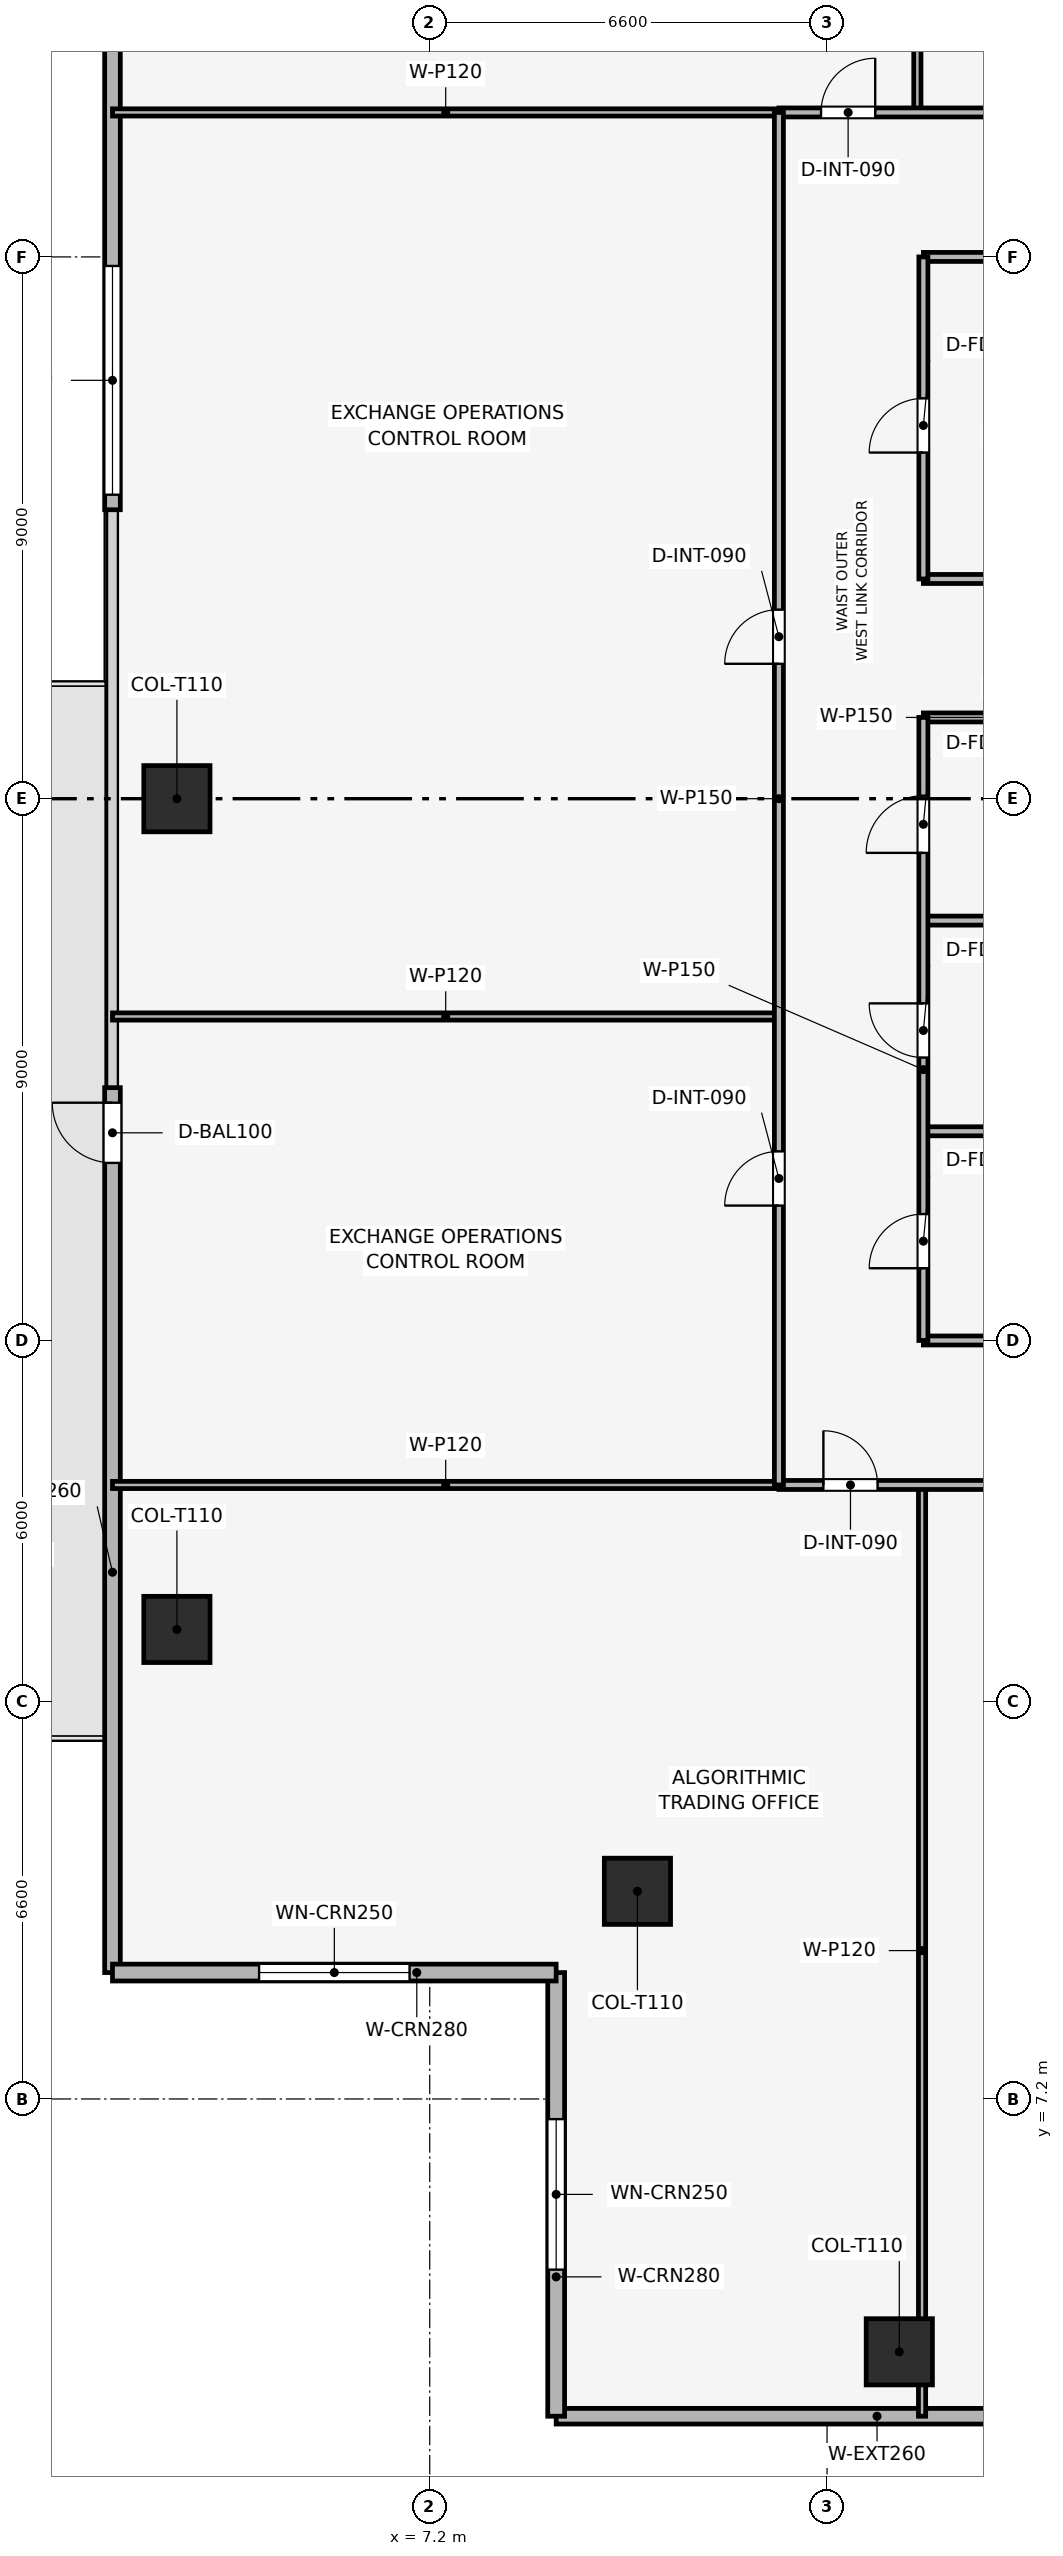
"""IFC4 building model, lengths in metres.
Left out: names, types, materials, properties, quantities, classifications, styles, units other than length and angle.
Written with IfcOpenShell. Run it as: python <this file> out.ifc"""

import sys

from ifc_helpers import new_model, si_unit, direction, frame, frame_2d, origin, origin_2d, place, context, subcontext, project, spatial, rectangle, extrude, element, fill, save


model = new_model("IFC4")
c1 = context("Model", 3, precision=1e-05, world=origin(), true_north=direction((0.0, 1.0)))
c2 = subcontext(c1, "Body", "Model", "MODEL_VIEW")
j1 = project(units=[si_unit("LENGTHUNIT", "METRE"), si_unit("PLANEANGLEUNIT", "RADIAN")], contexts=[c1])
p1 = place(None, origin())
s1 = spatial("IfcSite", under=j1, at=p1, CompositionType="ELEMENT")
p2 = place(p1, origin())
s2 = spatial("IfcBuilding", under=s1, at=p2, CompositionType="ELEMENT")
p3 = place(p2, frame((0.0, 0.0, 233.7)))
s3 = spatial("IfcBuildingStorey", under=s2, at=p3, CompositionType="ELEMENT", Elevation=233.7)
for number, where, z_axis, x_axis in (
    (1, (15.0, 3.0, 0.003), (0.0, 0.0, 1.0), (1.0, 0.0, 0.0)),
    (2, (3.0, 28.8, 0.003), (0.0, 0.0, 1.0), (1.0, 0.0, 0.0)),
    (3, (3.0, 15.0, 0.003), (0.0, 0.0, 1.0), (1.0, 0.0, 0.0)),
    (4, (10.65, 10.65, 0.003), (0.0, 0.0, 1.0), (1.0, 0.0, 0.0)),
):
    element("IfcColumn", number, at=place(p3, frame(where, z_axis=z_axis, x_axis=x_axis)), inside=s3, PredefinedType="COLUMN", context=c2, shape_type="SweptSolid", body=[
        extrude(rectangle(XDim=1.1, YDim=1.1, at=origin_2d()), origin(), (0.0, 0.0, 1.0), 3.494),
    ])
p4 = place(p3, frame((24.0, 1.93, 0.0), z_axis=(0.0, 0.0, 1.0), x_axis=(-1.0, 0.0, 0.0)))
e5 = element("IfcWall", 5, at=p4, inside=s3, PredefinedType="SOLIDWALL", context=c2, shape_type="SweptSolid", body=[
    extrude(rectangle(XDim=14.7, YDim=0.26, at=frame_2d((7.35, 0.0))), origin(), (0.0, 0.0, 1.0), 3.5),
])
p5 = place(p4, frame((2.33, 0.0, 0.9)))
e6 = element("IfcOpeningElement", 6, at=p5, cuts=e5, PredefinedType="OPENING", context=c2, shape_type="SweptSolid", body=[
    extrude(rectangle(XDim=3.8, YDim=1.9, at=frame_2d((1.9, 0.95))), frame((0.0, 0.14, 0.0), z_axis=(0.0, -1.0, 0.0), x_axis=(1.0, 0.0, 0.0)), (0.0, 0.0, 1.0), 0.28),
])
p6 = place(p3, frame((1.93, 9.3, 0.0), z_axis=(0.0, 0.0, 1.0), x_axis=(0.0, 1.0, 0.0)))
e7 = element("IfcWall", 7, at=p6, inside=s3, PredefinedType="SOLIDWALL", context=c2, shape_type="SweptSolid", body=[
    extrude(rectangle(XDim=14.7, YDim=0.26, at=frame_2d((7.35, 0.0))), origin(), (0.0, 0.0, 1.0), 3.5),
])
p7 = place(p6, frame((13.45, 0.0, 0.0)))
e8 = element("IfcOpeningElement", 8, at=p7, cuts=e7, PredefinedType="OPENING", context=c2, shape_type="SweptSolid", body=[
    extrude(rectangle(XDim=1.0, YDim=2.2, at=frame_2d((0.5, 1.1))), frame((0.0, 0.14, 0.0), z_axis=(0.0, -1.0, 0.0), x_axis=(1.0, 0.0, 0.0)), (0.0, 0.0, 1.0), 0.28),
])
p8 = place(p3, frame((1.93, 33.6, 0.0), z_axis=(0.0, 0.0, 1.0), x_axis=(0.0, 1.0, 0.0)))
e9 = element("IfcWall", 9, at=p8, inside=s3, PredefinedType="SOLIDWALL", context=c2, shape_type="SweptSolid", body=[
    extrude(rectangle(XDim=14.7, YDim=0.26, at=frame_2d((7.35, 0.0))), origin(), (0.0, 0.0, 1.0), 3.5),
])
p9 = place(p8, frame((0.25, 0.0, 0.9)))
e10 = element("IfcOpeningElement", 10, at=p9, cuts=e9, PredefinedType="OPENING", context=c2, shape_type="SweptSolid", body=[
    extrude(rectangle(XDim=3.8, YDim=1.9, at=frame_2d((1.9, 0.95))), frame((0.0, 0.14, 0.0), z_axis=(0.0, -1.0, 0.0), x_axis=(1.0, 0.0, 0.0)), (0.0, 0.0, 1.0), 0.28),
])
p10 = place(p3, frame((9.3, 1.93, 0.0), z_axis=(0.0, 0.0, 1.0), x_axis=(0.0, 1.0, 0.0)))
e11 = element("IfcWall", 11, at=p10, inside=s3, PredefinedType="SOLIDWALL", context=c2, shape_type="SweptSolid", body=[
    extrude(rectangle(XDim=7.37, YDim=0.28, at=frame_2d((3.685, 0.0))), origin(), (0.0, 0.0, 1.0), 3.5),
])
p11 = place(p10, frame((2.435, 0.0, 0.9)))
e12 = element("IfcOpeningElement", 12, at=p11, cuts=e11, PredefinedType="OPENING", context=c2, shape_type="SweptSolid", body=[
    extrude(rectangle(XDim=2.5, YDim=1.9, at=frame_2d((1.25, 0.95))), frame((0.0, 0.15, 0.0), z_axis=(0.0, -1.0, 0.0), x_axis=(1.0, 0.0, 0.0)), (0.0, 0.0, 1.0), 0.3),
])
p12 = place(p3, frame((9.3, 9.3, 0.0), z_axis=(0.0, 0.0, 1.0), x_axis=(-1.0, 0.0, 0.0)))
e13 = element("IfcWall", 13, at=p12, inside=s3, PredefinedType="SOLIDWALL", context=c2, shape_type="SweptSolid", body=[
    extrude(rectangle(XDim=7.37, YDim=0.28, at=frame_2d((3.685, 0.0))), origin(), (0.0, 0.0, 1.0), 3.5),
])
p13 = place(p12, frame((2.435, 0.0, 0.9)))
e14 = element("IfcOpeningElement", 14, at=p13, cuts=e13, PredefinedType="OPENING", context=c2, shape_type="SweptSolid", body=[
    extrude(rectangle(XDim=2.5, YDim=1.9, at=frame_2d((1.25, 0.95))), frame((0.0, 0.15, 0.0), z_axis=(0.0, -1.0, 0.0), x_axis=(1.0, 0.0, 0.0)), (0.0, 0.0, 1.0), 0.3),
])
p14 = place(p3, frame((15.4, 19.8, 0.0), z_axis=(0.0, 0.0, 1.0), x_axis=(1.0, 0.0, 0.0)))
e15 = element("IfcWall", 15, at=p14, inside=s3, PredefinedType="PARTITIONING", context=c2, shape_type="SweptSolid", body=[
    extrude(rectangle(XDim=4.4, YDim=0.15, at=frame_2d((2.2, 0.0))), origin(), (0.0, 0.0, 1.0), 3.035),
])
for number, where, z_axis, x_axis in (
    (16, (15.4, 23.275, 0.0), (0.0, 0.0, 1.0), (1.0, 0.0, 0.0)),
    (17, (15.4, 26.775, 0.0), (0.0, 0.0, 1.0), (1.0, 0.0, 0.0)),
    (18, (15.4, 30.15, 0.0), (0.0, 0.0, 1.0), (1.0, 0.0, 0.0)),
    (19, (15.4, 32.45, 0.0), (0.0, 0.0, 1.0), (1.0, 0.0, 0.0)),
):
    element("IfcWall", number, at=place(p3, frame(where, z_axis=z_axis, x_axis=x_axis)), inside=s3, PredefinedType="PARTITIONING", context=c2, shape_type="SweptSolid", body=[
        extrude(rectangle(XDim=4.4, YDim=0.15, at=frame_2d((2.2, 0.0))), origin(), (0.0, 0.0, 1.0), 3.5),
    ])
p15 = place(p3, frame((15.4, 37.8, 0.0), z_axis=(0.0, 0.0, 1.0), x_axis=(1.0, 0.0, 0.0)))
e20 = element("IfcWall", 20, at=p15, inside=s3, PredefinedType="PARTITIONING", context=c2, shape_type="SweptSolid", body=[
    extrude(rectangle(XDim=4.4, YDim=0.15, at=frame_2d((2.2, 0.0))), origin(), (0.0, 0.0, 1.0), 3.035),
])
p16 = place(p3, frame((15.4, 19.8, 0.0), z_axis=(0.0, 0.0, 1.0), x_axis=(0.0, 1.0, 0.0)))
e21 = element("IfcWall", 21, at=p16, inside=s3, PredefinedType="PARTITIONING", context=c2, shape_type="SweptSolid", body=[
    extrude(rectangle(XDim=10.35, YDim=0.15, at=frame_2d((5.175, 0.0))), origin(), (0.0, 0.0, 1.0), 3.035),
])
p17 = place(p16, frame((1.2, 0.0, 0.0)))
e22 = element("IfcOpeningElement", 22, at=p17, cuts=e21, PredefinedType="OPENING", context=c2, shape_type="SweptSolid", body=[
    extrude(rectangle(XDim=0.9, YDim=2.1, at=frame_2d((0.45, 1.05))), frame((0.0, 0.085, 0.0), z_axis=(0.0, -1.0, 0.0), x_axis=(1.0, 0.0, 0.0)), (0.0, 0.0, 1.0), 0.17),
])
p18 = place(p16, frame((4.7, 0.0, 0.0)))
e23 = element("IfcOpeningElement", 23, at=p18, cuts=e21, PredefinedType="OPENING", context=c2, shape_type="SweptSolid", body=[
    extrude(rectangle(XDim=0.9, YDim=2.1, at=frame_2d((0.45, 1.05))), frame((0.0, 0.085, 0.0), z_axis=(0.0, -1.0, 0.0), x_axis=(1.0, 0.0, 0.0)), (0.0, 0.0, 1.0), 0.17),
])
p19 = place(p16, frame((8.1, 0.0, 0.0)))
e24 = element("IfcOpeningElement", 24, at=p19, cuts=e21, PredefinedType="OPENING", context=c2, shape_type="SweptSolid", body=[
    extrude(rectangle(XDim=0.95, YDim=2.1, at=frame_2d((0.475, 1.05))), frame((0.0, 0.085, 0.0), z_axis=(0.0, -1.0, 0.0), x_axis=(1.0, 0.0, 0.0)), (0.0, 0.0, 1.0), 0.17),
])
p20 = place(p3, frame((15.4, 32.45, 0.0), z_axis=(0.0, 0.0, 1.0), x_axis=(0.0, 1.0, 0.0)))
e25 = element("IfcWall", 25, at=p20, inside=s3, PredefinedType="PARTITIONING", context=c2, shape_type="SweptSolid", body=[
    extrude(rectangle(XDim=5.35, YDim=0.15, at=frame_2d((2.675, 0.0))), origin(), (0.0, 0.0, 1.0), 3.035),
])
p21 = place(p20, frame((2.1, 0.0, 0.0)))
e26 = element("IfcOpeningElement", 26, at=p21, cuts=e25, PredefinedType="OPENING", context=c2, shape_type="SweptSolid", body=[
    extrude(rectangle(XDim=0.9, YDim=2.1, at=frame_2d((0.45, 1.05))), frame((0.0, 0.085, 0.0), z_axis=(0.0, -1.0, 0.0), x_axis=(1.0, 0.0, 0.0)), (0.0, 0.0, 1.0), 0.17),
])
for number, where, z_axis, x_axis in (
    (27, (15.378, 1.93, 0.0), (0.0, 0.0, 1.0), (0.0, 1.0, 0.0)),
    (28, (15.3, 40.2, 0.0), (0.0, 0.0, 1.0), (0.0, 1.0, 0.0)),
):
    element("IfcWall", number, at=place(p3, frame(where, z_axis=z_axis, x_axis=x_axis)), inside=s3, PredefinedType="PARTITIONING", context=c2, shape_type="SweptSolid", body=[
        extrude(rectangle(XDim=15.47, YDim=0.12, at=frame_2d((7.735, 0.0))), origin(), (0.0, 0.0, 1.0), 2.885),
    ])
for number, where, z_axis, x_axis in (
    (29, (1.93, 25.182, 0.0), (0.0, 0.0, 1.0), (1.0, 0.0, 0.0)),
    (30, (1.93, 17.4, 0.0), (0.0, 0.0, 1.0), (1.0, 0.0, 0.0)),
    (31, (1.93, 40.2, 0.0), (0.0, 0.0, 1.0), (1.0, 0.0, 0.0)),
):
    element("IfcWall", number, at=place(p3, frame(where, z_axis=z_axis, x_axis=x_axis)), inside=s3, PredefinedType="PARTITIONING", context=c2, shape_type="SweptSolid", body=[
        extrude(rectangle(XDim=11.07, YDim=0.12, at=frame_2d((5.535, 0.0))), origin(), (0.0, 0.0, 1.0), 2.885),
    ])
p22 = place(p3, frame((13.0, 17.4, 0.0), z_axis=(0.0, 0.0, 1.0), x_axis=(1.0, 0.0, 0.0)))
e32 = element("IfcWall", 32, at=p22, inside=s3, PredefinedType="PARTITIONING", context=c2, shape_type="SweptSolid", body=[
    extrude(rectangle(XDim=31.6, YDim=0.15, at=frame_2d((15.8, 0.0))), origin(), (0.0, 0.0, 1.0), 3.035),
])
p23 = place(p22, frame((0.739, 0.0, 0.0)))
e33 = element("IfcOpeningElement", 33, at=p23, cuts=e32, PredefinedType="OPENING", context=c2, shape_type="SweptSolid", body=[
    extrude(rectangle(XDim=0.9, YDim=2.1, at=frame_2d((0.45, 1.05))), frame((0.0, 0.085, 0.0), z_axis=(0.0, -1.0, 0.0), x_axis=(1.0, 0.0, 0.0)), (0.0, 0.0, 1.0), 0.17),
])
p24 = place(p22, frame((6.344, 0.0, 0.0)))
e34 = element("IfcOpeningElement", 34, at=p24, cuts=e32, PredefinedType="OPENING", context=c2, shape_type="SweptSolid", body=[
    extrude(rectangle(XDim=0.9, YDim=2.1, at=frame_2d((0.45, 1.05))), frame((0.0, 0.085, 0.0), z_axis=(0.0, -1.0, 0.0), x_axis=(1.0, 0.0, 0.0)), (0.0, 0.0, 1.0), 0.17),
])
p25 = place(p22, frame((15.174, 0.0, 0.0)))
e35 = element("IfcOpeningElement", 35, at=p25, cuts=e32, PredefinedType="OPENING", context=c2, shape_type="SweptSolid", body=[
    extrude(rectangle(XDim=0.9, YDim=2.1, at=frame_2d((0.45, 1.05))), frame((0.0, 0.085, 0.0), z_axis=(0.0, -1.0, 0.0), x_axis=(1.0, 0.0, 0.0)), (0.0, 0.0, 1.0), 0.17),
])
p26 = place(p22, frame((25.37, 0.0, 0.0)))
e36 = element("IfcOpeningElement", 36, at=p26, cuts=e32, PredefinedType="OPENING", context=c2, shape_type="SweptSolid", body=[
    extrude(rectangle(XDim=0.9, YDim=2.1, at=frame_2d((0.45, 1.05))), frame((0.0, 0.085, 0.0), z_axis=(0.0, -1.0, 0.0), x_axis=(1.0, 0.0, 0.0)), (0.0, 0.0, 1.0), 0.17),
])
p27 = place(p3, frame((13.0, 40.2, 0.0), z_axis=(0.0, 0.0, 1.0), x_axis=(1.0, 0.0, 0.0)))
e37 = element("IfcWall", 37, at=p27, inside=s3, PredefinedType="PARTITIONING", context=c2, shape_type="SweptSolid", body=[
    extrude(rectangle(XDim=31.6, YDim=0.15, at=frame_2d((15.8, 0.0))), origin(), (0.0, 0.0, 1.0), 3.035),
])
p28 = place(p27, frame((0.7, 0.0, 0.0)))
e38 = element("IfcOpeningElement", 38, at=p28, cuts=e37, PredefinedType="OPENING", context=c2, shape_type="SweptSolid", body=[
    extrude(rectangle(XDim=0.9, YDim=2.1, at=frame_2d((0.45, 1.05))), frame((0.0, 0.085, 0.0), z_axis=(0.0, -1.0, 0.0), x_axis=(1.0, 0.0, 0.0)), (0.0, 0.0, 1.0), 0.17),
])
p29 = place(p27, frame((6.454, 0.0, 0.0)))
e39 = element("IfcOpeningElement", 39, at=p29, cuts=e37, PredefinedType="OPENING", context=c2, shape_type="SweptSolid", body=[
    extrude(rectangle(XDim=0.9, YDim=2.1, at=frame_2d((0.45, 1.05))), frame((0.0, 0.085, 0.0), z_axis=(0.0, -1.0, 0.0), x_axis=(1.0, 0.0, 0.0)), (0.0, 0.0, 1.0), 0.17),
])
p30 = place(p27, frame((15.473, 0.0, 0.0)))
e40 = element("IfcOpeningElement", 40, at=p30, cuts=e37, PredefinedType="OPENING", context=c2, shape_type="SweptSolid", body=[
    extrude(rectangle(XDim=0.9, YDim=2.1, at=frame_2d((0.45, 1.05))), frame((0.0, 0.085, 0.0), z_axis=(0.0, -1.0, 0.0), x_axis=(1.0, 0.0, 0.0)), (0.0, 0.0, 1.0), 0.17),
])
p31 = place(p27, frame((25.519, 0.0, 0.0)))
e41 = element("IfcOpeningElement", 41, at=p31, cuts=e37, PredefinedType="OPENING", context=c2, shape_type="SweptSolid", body=[
    extrude(rectangle(XDim=0.9, YDim=2.1, at=frame_2d((0.45, 1.05))), frame((0.0, 0.085, 0.0), z_axis=(0.0, -1.0, 0.0), x_axis=(1.0, 0.0, 0.0)), (0.0, 0.0, 1.0), 0.17),
])
p32 = place(p3, frame((13.0, 17.4, 0.0), z_axis=(0.0, 0.0, 1.0), x_axis=(0.0, 1.0, 0.0)))
e42 = element("IfcWall", 42, at=p32, inside=s3, PredefinedType="PARTITIONING", context=c2, shape_type="SweptSolid", body=[
    extrude(rectangle(XDim=22.8, YDim=0.15, at=frame_2d((11.4, 0.0))), origin(), (0.0, 0.0, 1.0), 3.035),
])
p33 = place(p32, frame((4.641, 0.0, 0.0)))
e43 = element("IfcOpeningElement", 43, at=p33, cuts=e42, PredefinedType="OPENING", context=c2, shape_type="SweptSolid", body=[
    extrude(rectangle(XDim=0.9, YDim=2.1, at=frame_2d((0.45, 1.05))), frame((0.0, 0.085, 0.0), z_axis=(0.0, -1.0, 0.0), x_axis=(1.0, 0.0, 0.0)), (0.0, 0.0, 1.0), 0.17),
])
p34 = place(p32, frame((13.641, 0.0, 0.0)))
e44 = element("IfcOpeningElement", 44, at=p34, cuts=e42, PredefinedType="OPENING", context=c2, shape_type="SweptSolid", body=[
    extrude(rectangle(XDim=0.9, YDim=2.1, at=frame_2d((0.45, 1.05))), frame((0.0, 0.085, 0.0), z_axis=(0.0, -1.0, 0.0), x_axis=(1.0, 0.0, 0.0)), (0.0, 0.0, 1.0), 0.17),
])
p35 = place(p7, origin())
e45 = element("IfcDoor", 45, at=p35, inside=s3, OperationType="SINGLE_SWING_RIGHT", PredefinedType="DOOR", context=c2, shape_type="SweptSolid", body=[
    extrude(rectangle(XDim=1.0, YDim=2.2, at=frame_2d((0.5, 1.1))), frame((0.0, 0.025, 0.0), z_axis=(0.0, -1.0, 0.0), x_axis=(1.0, 0.0, 0.0)), (0.0, 0.0, 1.0), 0.05),
])
fill(e8, e45)
p36 = place(p9, origin())
e46 = element("IfcWindow", 46, at=p36, inside=s3, PartitioningType="SINGLE_PANEL", PredefinedType="WINDOW", context=c2, shape_type="SweptSolid", body=[
    extrude(rectangle(XDim=3.8, YDim=1.9, at=frame_2d((1.9, 0.95))), frame((0.0, 0.03, 0.0), z_axis=(0.0, -1.0, 0.0), x_axis=(1.0, 0.0, 0.0)), (0.0, 0.0, 1.0), 0.06),
])
fill(e10, e46)
p37 = place(p11, origin())
e47 = element("IfcWindow", 47, at=p37, inside=s3, PartitioningType="SINGLE_PANEL", PredefinedType="WINDOW", context=c2, shape_type="SweptSolid", body=[
    extrude(rectangle(XDim=2.5, YDim=1.9, at=frame_2d((1.25, 0.95))), frame((0.0, 0.03, 0.0), z_axis=(0.0, -1.0, 0.0), x_axis=(1.0, 0.0, 0.0)), (0.0, 0.0, 1.0), 0.06),
])
fill(e12, e47)
p38 = place(p13, origin())
e48 = element("IfcWindow", 48, at=p38, inside=s3, PartitioningType="SINGLE_PANEL", PredefinedType="WINDOW", context=c2, shape_type="SweptSolid", body=[
    extrude(rectangle(XDim=2.5, YDim=1.9, at=frame_2d((1.25, 0.95))), frame((0.0, 0.03, 0.0), z_axis=(0.0, -1.0, 0.0), x_axis=(1.0, 0.0, 0.0)), (0.0, 0.0, 1.0), 0.06),
])
fill(e14, e48)
p39 = place(p17, origin())
e49 = element("IfcDoor", 49, at=p39, inside=s3, OperationType="SINGLE_SWING_LEFT", PredefinedType="DOOR", context=c2, shape_type="SweptSolid", body=[
    extrude(rectangle(XDim=0.9, YDim=2.1, at=frame_2d((0.45, 1.05))), frame((0.0, 0.025, 0.0), z_axis=(0.0, -1.0, 0.0), x_axis=(1.0, 0.0, 0.0)), (0.0, 0.0, 1.0), 0.05),
])
fill(e22, e49)
p40 = place(p18, origin())
e50 = element("IfcDoor", 50, at=p40, inside=s3, OperationType="SINGLE_SWING_RIGHT", PredefinedType="DOOR", context=c2, shape_type="SweptSolid", body=[
    extrude(rectangle(XDim=0.9, YDim=2.1, at=frame_2d((0.45, 1.05))), frame((0.0, 0.025, 0.0), z_axis=(0.0, -1.0, 0.0), x_axis=(1.0, 0.0, 0.0)), (0.0, 0.0, 1.0), 0.05),
])
fill(e23, e50)
p41 = place(p19, origin())
e51 = element("IfcDoor", 51, at=p41, inside=s3, OperationType="SINGLE_SWING_LEFT", PredefinedType="DOOR", context=c2, shape_type="SweptSolid", body=[
    extrude(rectangle(XDim=0.95, YDim=2.1, at=frame_2d((0.475, 1.05))), frame((0.0, 0.025, 0.0), z_axis=(0.0, -1.0, 0.0), x_axis=(1.0, 0.0, 0.0)), (0.0, 0.0, 1.0), 0.05),
])
fill(e24, e51)
p42 = place(p21, origin())
e52 = element("IfcDoor", 52, at=p42, inside=s3, OperationType="SINGLE_SWING_LEFT", PredefinedType="DOOR", context=c2, shape_type="SweptSolid", body=[
    extrude(rectangle(XDim=0.9, YDim=2.1, at=frame_2d((0.45, 1.05))), frame((0.0, 0.025, 0.0), z_axis=(0.0, -1.0, 0.0), x_axis=(1.0, 0.0, 0.0)), (0.0, 0.0, 1.0), 0.05),
])
fill(e26, e52)
p43 = place(p23, origin())
e53 = element("IfcDoor", 53, at=p43, inside=s3, OperationType="SINGLE_SWING_LEFT", PredefinedType="DOOR", context=c2, shape_type="SweptSolid", body=[
    extrude(rectangle(XDim=0.9, YDim=2.1, at=frame_2d((0.45, 1.05))), frame((0.0, 0.025, 0.0), z_axis=(0.0, -1.0, 0.0), x_axis=(1.0, 0.0, 0.0)), (0.0, 0.0, 1.0), 0.05),
])
fill(e33, e53)
p44 = place(p28, origin())
e54 = element("IfcDoor", 54, at=p44, inside=s3, OperationType="SINGLE_SWING_RIGHT", PredefinedType="DOOR", context=c2, shape_type="SweptSolid", body=[
    extrude(rectangle(XDim=0.9, YDim=2.1, at=frame_2d((0.45, 1.05))), frame((0.0, 0.025, 0.0), z_axis=(0.0, -1.0, 0.0), x_axis=(1.0, 0.0, 0.0)), (0.0, 0.0, 1.0), 0.05),
])
fill(e38, e54)
p45 = place(p33, origin())
e55 = element("IfcDoor", 55, at=p45, inside=s3, OperationType="SINGLE_SWING_LEFT", PredefinedType="DOOR", context=c2, shape_type="SweptSolid", body=[
    extrude(rectangle(XDim=0.9, YDim=2.1, at=frame_2d((0.45, 1.05))), frame((0.0, 0.025, 0.0), z_axis=(0.0, -1.0, 0.0), x_axis=(1.0, 0.0, 0.0)), (0.0, 0.0, 1.0), 0.05),
])
fill(e43, e55)
p46 = place(p34, origin())
e56 = element("IfcDoor", 56, at=p46, inside=s3, OperationType="SINGLE_SWING_LEFT", PredefinedType="DOOR", context=c2, shape_type="SweptSolid", body=[
    extrude(rectangle(XDim=0.9, YDim=2.1, at=frame_2d((0.45, 1.05))), frame((0.0, 0.025, 0.0), z_axis=(0.0, -1.0, 0.0), x_axis=(1.0, 0.0, 0.0)), (0.0, 0.0, 1.0), 0.05),
])
fill(e44, e56)
save(model, sys.argv[1])
